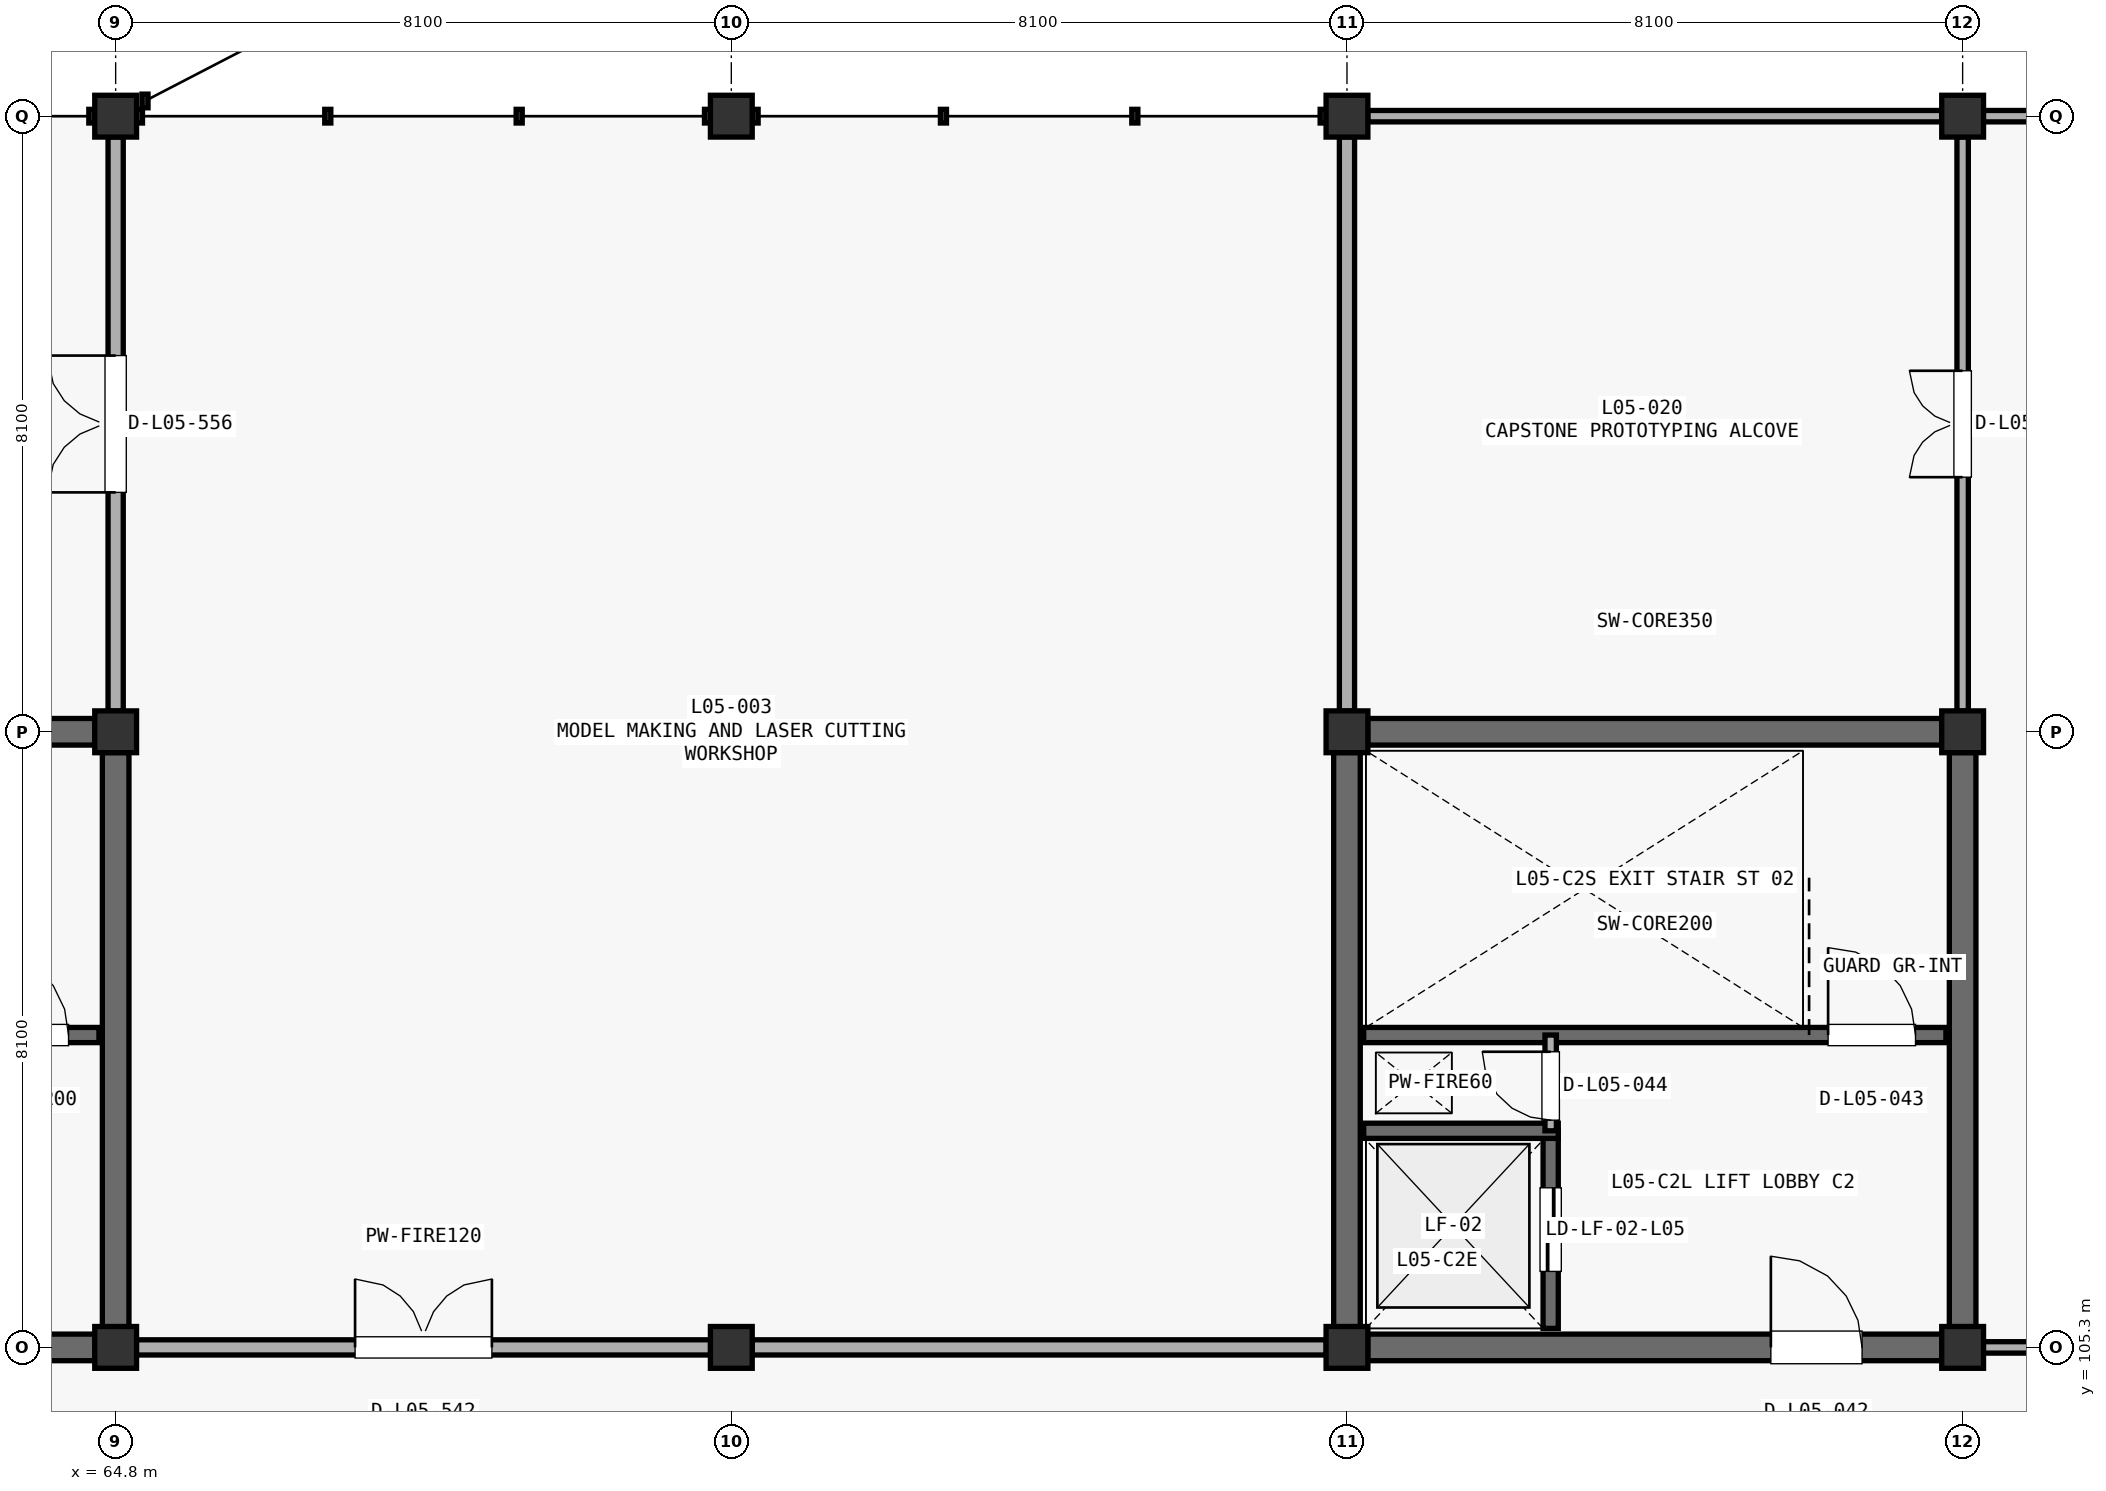
"""IFC4 building model, lengths in metres.
Left out: names, types, materials, properties, quantities, classifications, styles, units other than length and angle.
Written with IfcOpenShell. Run it as: python <this file> out.ifc"""

import sys

from ifc_helpers import new_model, si_unit, direction, frame, frame_2d, origin, origin_2d, place, context, subcontext, project, spatial, rectangle, extrude, element, fill, save


model = new_model("IFC4")
c1 = context("Model", 3, precision=1e-05, world=origin(), true_north=direction((0.0, 1.0)))
c2 = subcontext(c1, "Body", "Model", "MODEL_VIEW")
j1 = project(units=[si_unit("LENGTHUNIT", "METRE"), si_unit("PLANEANGLEUNIT", "RADIAN")], contexts=[c1])
p1 = place(None, origin())
s1 = spatial("IfcSite", under=j1, at=p1, CompositionType="ELEMENT")
p2 = place(p1, origin())
s2 = spatial("IfcBuilding", under=s1, at=p2, CompositionType="ELEMENT")
p3 = place(p2, frame((0.0, 0.0, 22.95)))
s3 = spatial("IfcBuildingStorey", under=s2, at=p3, CompositionType="ELEMENT", Elevation=22.95)
for number, where, z_axis, x_axis in (
    (1, (64.8, 105.3, 0.0), (0.0, 0.0, 1.0), (1.0, 0.0, 0.0)),
    (2, (64.8, 113.4, 0.0), (0.0, 0.0, 1.0), (1.0, 0.0, 0.0)),
    (3, (64.8, 121.5, 0.0), (0.0, 0.0, 1.0), (1.0, 0.0, 0.0)),
    (4, (72.9, 105.3, 0.0), (0.0, 0.0, 1.0), (1.0, 0.0, 0.0)),
    (5, (72.9, 113.4, 0.0), (0.0, 0.0, 1.0), (1.0, 0.0, 0.0)),
    (6, (72.9, 121.5, 0.0), (0.0, 0.0, 1.0), (1.0, 0.0, 0.0)),
    (7, (81.0, 105.3, 0.0), (0.0, 0.0, 1.0), (1.0, 0.0, 0.0)),
    (8, (81.0, 113.4, 0.0), (0.0, 0.0, 1.0), (1.0, 0.0, 0.0)),
    (9, (81.0, 121.5, 0.0), (0.0, 0.0, 1.0), (1.0, 0.0, 0.0)),
    (10, (89.1, 105.3, 0.0), (0.0, 0.0, 1.0), (1.0, 0.0, 0.0)),
    (11, (89.1, 113.4, 0.0), (0.0, 0.0, 1.0), (1.0, 0.0, 0.0)),
    (12, (89.1, 121.5, 0.0), (0.0, 0.0, 1.0), (1.0, 0.0, 0.0)),
):
    element("IfcColumn", number, at=place(p3, frame(where, z_axis=z_axis, x_axis=x_axis)), inside=s3, PredefinedType="COLUMN", context=c2, shape_type="SweptSolid", body=[
        extrude(rectangle(XDim=0.55, YDim=0.55, at=origin_2d()), origin(), (0.0, 0.0, 1.0), 4.42),
    ])
for number, where, z_axis, x_axis in (
    (13, (81.273, 113.4, 0.0), (0.0, 0.0, 1.0), (1.0, 0.0, 0.0)),
    (14, (81.0, 105.573, 0.0), (0.0, 0.0, 1.0), (0.0, 1.0, 0.0)),
    (15, (89.1, 105.573, 0.0), (0.0, 0.0, 1.0), (0.0, 1.0, 0.0)),
):
    element("IfcWall", number, at=place(p3, frame(where, z_axis=z_axis, x_axis=x_axis)), inside=s3, PredefinedType="SHEAR", context=c2, shape_type="SweptSolid", body=[
        extrude(rectangle(XDim=7.554, YDim=0.35, at=frame_2d((3.777, 0.0))), origin(), (0.0, 0.0, 1.0), 4.162),
    ])
p4 = place(p3, frame((81.273, 105.3, 0.0), z_axis=(0.0, 0.0, 1.0), x_axis=(1.0, 0.0, 0.0)))
e16 = element("IfcWall", 16, at=p4, inside=s3, PredefinedType="SHEAR", context=c2, shape_type="SweptSolid", body=[
    extrude(rectangle(XDim=7.554, YDim=0.35, at=frame_2d((3.777, 0.0))), origin(), (0.0, 0.0, 1.0), 4.162),
])
p5 = place(p4, frame((5.304, 0.0, 0.0)))
e17 = element("IfcOpeningElement", 17, at=p5, cuts=e16, PredefinedType="OPENING", context=c2, shape_type="SweptSolid", body=[
    extrude(rectangle(XDim=1.2, YDim=2.2, at=frame_2d((0.6, 1.1))), frame((0.0, 0.185, 0.0), z_axis=(0.0, -1.0, 0.0), x_axis=(1.0, 0.0, 0.0)), (0.0, 0.0, 1.0), 0.37),
])
p6 = place(p3, frame((81.22, 109.41, 0.0), z_axis=(0.0, 0.0, 1.0), x_axis=(1.0, 0.0, 0.0)))
e18 = element("IfcWall", 18, at=p6, inside=s3, PredefinedType="SHEAR", context=c2, shape_type="SweptSolid", body=[
    extrude(rectangle(XDim=7.66, YDim=0.2, at=frame_2d((3.83, 0.0))), origin(), (0.0, 0.0, 1.0), 4.162),
])
p7 = place(p6, frame((6.11, 0.0, 0.0)))
e19 = element("IfcOpeningElement", 19, at=p7, cuts=e18, PredefinedType="OPENING", context=c2, shape_type="SweptSolid", body=[
    extrude(rectangle(XDim=1.15, YDim=2.2, at=frame_2d((0.575, 1.1))), frame((0.0, 0.11, 0.0), z_axis=(0.0, -1.0, 0.0), x_axis=(1.0, 0.0, 0.0)), (0.0, 0.0, 1.0), 0.22),
])
p8 = place(p3, frame((83.68, 105.55, 0.0), z_axis=(0.0, 0.0, 1.0), x_axis=(0.0, 1.0, 0.0)))
e20 = element("IfcWall", 20, at=p8, inside=s3, PredefinedType="SHEAR", context=c2, shape_type="SweptSolid", body=[
    extrude(rectangle(XDim=2.6, YDim=0.2, at=frame_2d((1.3, 0.0))), origin(), (0.0, 0.0, 1.0), 4.162),
])
p9 = place(p8, frame((0.75, 0.0, 0.0)))
e21 = element("IfcOpeningElement", 21, at=p9, cuts=e20, PredefinedType="OPENING", context=c2, shape_type="SweptSolid", body=[
    extrude(rectangle(XDim=1.1, YDim=2.2, at=frame_2d((0.55, 1.1))), frame((0.0, 0.11, 0.0), z_axis=(0.0, -1.0, 0.0), x_axis=(1.0, 0.0, 0.0)), (0.0, 0.0, 1.0), 0.22),
])
p10 = place(p3, frame((81.22, 108.15, 0.0), z_axis=(0.0, 0.0, 1.0), x_axis=(1.0, 0.0, 0.0)))
e22 = element("IfcWall", 22, at=p10, inside=s3, PredefinedType="SHEAR", context=c2, shape_type="SweptSolid", body=[
    extrude(rectangle(XDim=2.56, YDim=0.2, at=frame_2d((1.28, 0.0))), origin(), (0.0, 0.0, 1.0), 4.162),
])
p11 = place(p3, frame((83.68, 108.15, 0.0), z_axis=(0.0, 0.0, 1.0), x_axis=(0.0, 1.0, 0.0)))
e23 = element("IfcWall", 23, at=p11, inside=s3, PredefinedType="PARTITIONING", context=c2, shape_type="SweptSolid", body=[
    extrude(rectangle(XDim=1.26, YDim=0.15, at=frame_2d((0.63, 0.0))), origin(), (0.0, 0.0, 1.0), 4.162),
])
p12 = place(p11, frame((0.14, 0.0, 0.0)))
e24 = element("IfcOpeningElement", 24, at=p12, cuts=e23, PredefinedType="OPENING", context=c2, shape_type="SweptSolid", body=[
    extrude(rectangle(XDim=0.9, YDim=2.15, at=frame_2d((0.45, 1.075))), frame((0.0, 0.085, 0.0), z_axis=(0.0, -1.0, 0.0), x_axis=(1.0, 0.0, 0.0)), (0.0, 0.0, 1.0), 0.17),
])
p13 = place(p3, frame((56.973, 113.4, 0.0), z_axis=(0.0, 0.0, 1.0), x_axis=(1.0, 0.0, 0.0)))
e25 = element("IfcWall", 25, at=p13, inside=s3, PredefinedType="SHEAR", context=c2, shape_type="SweptSolid", body=[
    extrude(rectangle(XDim=7.554, YDim=0.35, at=frame_2d((3.777, 0.0))), origin(), (0.0, 0.0, 1.0), 4.162),
])
p14 = place(p3, frame((64.8, 105.573, 0.0), z_axis=(0.0, 0.0, 1.0), x_axis=(0.0, 1.0, 0.0)))
e26 = element("IfcWall", 26, at=p14, inside=s3, PredefinedType="SHEAR", context=c2, shape_type="SweptSolid", body=[
    extrude(rectangle(XDim=7.554, YDim=0.35, at=frame_2d((3.777, 0.0))), origin(), (0.0, 0.0, 1.0), 4.162),
])
p15 = place(p3, frame((56.973, 105.3, 0.0), z_axis=(0.0, 0.0, 1.0), x_axis=(1.0, 0.0, 0.0)))
e27 = element("IfcWall", 27, at=p15, inside=s3, PredefinedType="SHEAR", context=c2, shape_type="SweptSolid", body=[
    extrude(rectangle(XDim=7.554, YDim=0.35, at=frame_2d((3.777, 0.0))), origin(), (0.0, 0.0, 1.0), 4.162),
])
p16 = place(p15, frame((5.304, 0.0, 0.0)))
e28 = element("IfcOpeningElement", 28, at=p16, cuts=e27, PredefinedType="OPENING", context=c2, shape_type="SweptSolid", body=[
    extrude(rectangle(XDim=1.2, YDim=2.2, at=frame_2d((0.6, 1.1))), frame((0.0, 0.185, 0.0), z_axis=(0.0, -1.0, 0.0), x_axis=(1.0, 0.0, 0.0)), (0.0, 0.0, 1.0), 0.37),
])
p17 = place(p3, frame((56.92, 109.41, 0.0), z_axis=(0.0, 0.0, 1.0), x_axis=(1.0, 0.0, 0.0)))
e29 = element("IfcWall", 29, at=p17, inside=s3, PredefinedType="SHEAR", context=c2, shape_type="SweptSolid", body=[
    extrude(rectangle(XDim=7.66, YDim=0.2, at=frame_2d((3.83, 0.0))), origin(), (0.0, 0.0, 1.0), 4.162),
])
p18 = place(p17, frame((6.11, 0.0, 0.0)))
e30 = element("IfcOpeningElement", 30, at=p18, cuts=e29, PredefinedType="OPENING", context=c2, shape_type="SweptSolid", body=[
    extrude(rectangle(XDim=1.15, YDim=2.2, at=frame_2d((0.575, 1.1))), frame((0.0, 0.11, 0.0), z_axis=(0.0, -1.0, 0.0), x_axis=(1.0, 0.0, 0.0)), (0.0, 0.0, 1.0), 0.22),
])
p19 = place(p3, frame((65.073, 105.3, 0.0), z_axis=(0.0, 0.0, 1.0), x_axis=(1.0, 0.0, 0.0)))
e31 = element("IfcWall", 31, at=p19, inside=s3, PredefinedType="PARTITIONING", context=c2, shape_type="SweptSolid", body=[
    extrude(rectangle(XDim=7.554, YDim=0.2, at=frame_2d((3.777, 0.0))), origin(), (0.0, 0.0, 1.0), 3.562),
])
p20 = place(p19, frame((2.877, 0.0, 0.0)))
e32 = element("IfcOpeningElement", 32, at=p20, cuts=e31, PredefinedType="OPENING", context=c2, shape_type="SweptSolid", body=[
    extrude(rectangle(XDim=1.8, YDim=2.4, at=frame_2d((0.9, 1.2))), frame((0.0, 0.11, 0.0), z_axis=(0.0, -1.0, 0.0), x_axis=(1.0, 0.0, 0.0)), (0.0, 0.0, 1.0), 0.22),
])
p21 = place(p3, frame((73.173, 105.3, 0.0), z_axis=(0.0, 0.0, 1.0), x_axis=(1.0, 0.0, 0.0)))
e33 = element("IfcWall", 33, at=p21, inside=s3, PredefinedType="PARTITIONING", context=c2, shape_type="SweptSolid", body=[
    extrude(rectangle(XDim=7.554, YDim=0.2, at=frame_2d((3.777, 0.0))), origin(), (0.0, 0.0, 1.0), 3.312),
])
p22 = place(p3, frame((81.0, 113.673, 0.0), z_axis=(0.0, 0.0, 1.0), x_axis=(0.0, 1.0, 0.0)))
e34 = element("IfcWall", 34, at=p22, inside=s3, PredefinedType="PARTITIONING", context=c2, shape_type="SweptSolid", body=[
    extrude(rectangle(XDim=7.554, YDim=0.2, at=frame_2d((3.777, 0.0))), origin(), (0.0, 0.0, 1.0), 3.412),
])
p23 = place(p3, frame((64.8, 113.673, 0.0), z_axis=(0.0, 0.0, 1.0), x_axis=(0.0, 1.0, 0.0)))
e35 = element("IfcWall", 35, at=p23, inside=s3, PredefinedType="PARTITIONING", context=c2, shape_type="SweptSolid", body=[
    extrude(rectangle(XDim=7.554, YDim=0.2, at=frame_2d((3.777, 0.0))), origin(), (0.0, 0.0, 1.0), 3.512),
])
p24 = place(p23, frame((2.877, 0.0, 0.0)))
e36 = element("IfcOpeningElement", 36, at=p24, cuts=e35, PredefinedType="OPENING", context=c2, shape_type="SweptSolid", body=[
    extrude(rectangle(XDim=1.8, YDim=2.4, at=frame_2d((0.9, 1.2))), frame((0.0, 0.11, 0.0), z_axis=(0.0, -1.0, 0.0), x_axis=(1.0, 0.0, 0.0)), (0.0, 0.0, 1.0), 0.22),
])
p25 = place(p3, frame((89.373, 105.3, 0.0), z_axis=(0.0, 0.0, 1.0), x_axis=(1.0, 0.0, 0.0)))
e37 = element("IfcWall", 37, at=p25, inside=s3, PredefinedType="PARTITIONING", context=c2, shape_type="SweptSolid", body=[
    extrude(rectangle(XDim=7.554, YDim=0.15, at=frame_2d((3.777, 0.0))), origin(), (0.0, 0.0, 1.0), 3.412),
])
p26 = place(p25, frame((2.957, 0.0, 0.0)))
e38 = element("IfcOpeningElement", 38, at=p26, cuts=e37, PredefinedType="OPENING", context=c2, shape_type="SweptSolid", body=[
    extrude(rectangle(XDim=1.64, YDim=2.25, at=frame_2d((0.82, 1.125))), frame((0.0, 0.085, 0.0), z_axis=(0.0, -1.0, 0.0), x_axis=(1.0, 0.0, 0.0)), (0.0, 0.0, 1.0), 0.17),
])
p27 = place(p3, frame((89.1, 113.673, 0.0), z_axis=(0.0, 0.0, 1.0), x_axis=(0.0, 1.0, 0.0)))
e39 = element("IfcWall", 39, at=p27, inside=s3, PredefinedType="PARTITIONING", context=c2, shape_type="SweptSolid", body=[
    extrude(rectangle(XDim=7.554, YDim=0.15, at=frame_2d((3.777, 0.0))), origin(), (0.0, 0.0, 1.0), 3.562),
])
p28 = place(p27, frame((3.077, 0.0, 0.0)))
e40 = element("IfcOpeningElement", 40, at=p28, cuts=e39, PredefinedType="OPENING", context=c2, shape_type="SweptSolid", body=[
    extrude(rectangle(XDim=1.4, YDim=2.2, at=frame_2d((0.7, 1.1))), frame((0.0, 0.085, 0.0), z_axis=(0.0, -1.0, 0.0), x_axis=(1.0, 0.0, 0.0)), (0.0, 0.0, 1.0), 0.17),
])
p29 = place(p3, frame((89.373, 121.5, 0.0), z_axis=(0.0, 0.0, 1.0), x_axis=(1.0, 0.0, 0.0)))
e41 = element("IfcWall", 41, at=p29, inside=s3, PredefinedType="PARTITIONING", context=c2, shape_type="SweptSolid", body=[
    extrude(rectangle(XDim=7.554, YDim=0.15, at=frame_2d((3.777, 0.0))), origin(), (0.0, 0.0, 1.0), 3.562),
])
p30 = place(p3, frame((81.273, 121.5, 0.0), z_axis=(0.0, 0.0, 1.0), x_axis=(1.0, 0.0, 0.0)))
e42 = element("IfcWall", 42, at=p30, inside=s3, PredefinedType="PARTITIONING", context=c2, shape_type="SweptSolid", body=[
    extrude(rectangle(XDim=7.554, YDim=0.15, at=frame_2d((3.777, 0.0))), origin(), (0.0, 0.0, 1.0), 3.512),
])
p31 = place(p5, origin())
e43 = element("IfcDoor", 43, at=p31, inside=s3, OperationType="SINGLE_SWING_LEFT", PredefinedType="DOOR", context=c2, shape_type="SweptSolid", body=[
    extrude(rectangle(XDim=1.2, YDim=2.2, at=frame_2d((0.6, 1.1))), frame((0.0, 0.025, 0.0), z_axis=(0.0, -1.0, 0.0), x_axis=(1.0, 0.0, 0.0)), (0.0, 0.0, 1.0), 0.05),
])
fill(e17, e43)
p32 = place(p7, origin())
e44 = element("IfcDoor", 44, at=p32, inside=s3, OperationType="SINGLE_SWING_LEFT", PredefinedType="DOOR", context=c2, shape_type="SweptSolid", body=[
    extrude(rectangle(XDim=1.15, YDim=2.2, at=frame_2d((0.575, 1.1))), frame((0.0, 0.025, 0.0), z_axis=(0.0, -1.0, 0.0), x_axis=(1.0, 0.0, 0.0)), (0.0, 0.0, 1.0), 0.05),
])
fill(e19, e44)
p33 = place(p9, origin())
e45 = element("IfcDoor", 45, at=p33, inside=s3, OperationType="SLIDING_TO_LEFT", PredefinedType="DOOR", context=c2, shape_type="SweptSolid", body=[
    extrude(rectangle(XDim=1.1, YDim=2.2, at=frame_2d((0.55, 1.1))), frame((0.0, 0.025, 0.0), z_axis=(0.0, -1.0, 0.0), x_axis=(1.0, 0.0, 0.0)), (0.0, 0.0, 1.0), 0.05),
])
fill(e21, e45)
p34 = place(p12, origin())
e46 = element("IfcDoor", 46, at=p34, inside=s3, OperationType="SINGLE_SWING_RIGHT", PredefinedType="DOOR", context=c2, shape_type="SweptSolid", body=[
    extrude(rectangle(XDim=0.9, YDim=2.15, at=frame_2d((0.45, 1.075))), frame((0.0, 0.025, 0.0), z_axis=(0.0, -1.0, 0.0), x_axis=(1.0, 0.0, 0.0)), (0.0, 0.0, 1.0), 0.05),
])
fill(e24, e46)
p35 = place(p18, origin())
e47 = element("IfcDoor", 47, at=p35, inside=s3, OperationType="SINGLE_SWING_LEFT", PredefinedType="DOOR", context=c2, shape_type="SweptSolid", body=[
    extrude(rectangle(XDim=1.15, YDim=2.2, at=frame_2d((0.575, 1.1))), frame((0.0, 0.025, 0.0), z_axis=(0.0, -1.0, 0.0), x_axis=(1.0, 0.0, 0.0)), (0.0, 0.0, 1.0), 0.05),
])
fill(e30, e47)
p36 = place(p20, origin())
e48 = element("IfcDoor", 48, at=p36, inside=s3, OperationType="DOUBLE_SWING_LEFT", PredefinedType="DOOR", context=c2, shape_type="SweptSolid", body=[
    extrude(rectangle(XDim=1.8, YDim=2.4, at=frame_2d((0.9, 1.2))), frame((0.0, 0.025, 0.0), z_axis=(0.0, -1.0, 0.0), x_axis=(1.0, 0.0, 0.0)), (0.0, 0.0, 1.0), 0.05),
])
fill(e32, e48)
p37 = place(p24, origin())
e49 = element("IfcDoor", 49, at=p37, inside=s3, OperationType="DOUBLE_SWING_LEFT", PredefinedType="DOOR", context=c2, shape_type="SweptSolid", body=[
    extrude(rectangle(XDim=1.8, YDim=2.4, at=frame_2d((0.9, 1.2))), frame((0.0, 0.025, 0.0), z_axis=(0.0, -1.0, 0.0), x_axis=(1.0, 0.0, 0.0)), (0.0, 0.0, 1.0), 0.05),
])
fill(e36, e49)
p38 = place(p28, origin())
e50 = element("IfcDoor", 50, at=p38, inside=s3, OperationType="DOUBLE_SWING_LEFT", PredefinedType="DOOR", context=c2, shape_type="SweptSolid", body=[
    extrude(rectangle(XDim=1.4, YDim=2.2, at=frame_2d((0.7, 1.1))), frame((0.0, 0.025, 0.0), z_axis=(0.0, -1.0, 0.0), x_axis=(1.0, 0.0, 0.0)), (0.0, 0.0, 1.0), 0.05),
])
fill(e40, e50)
save(model, sys.argv[1])
